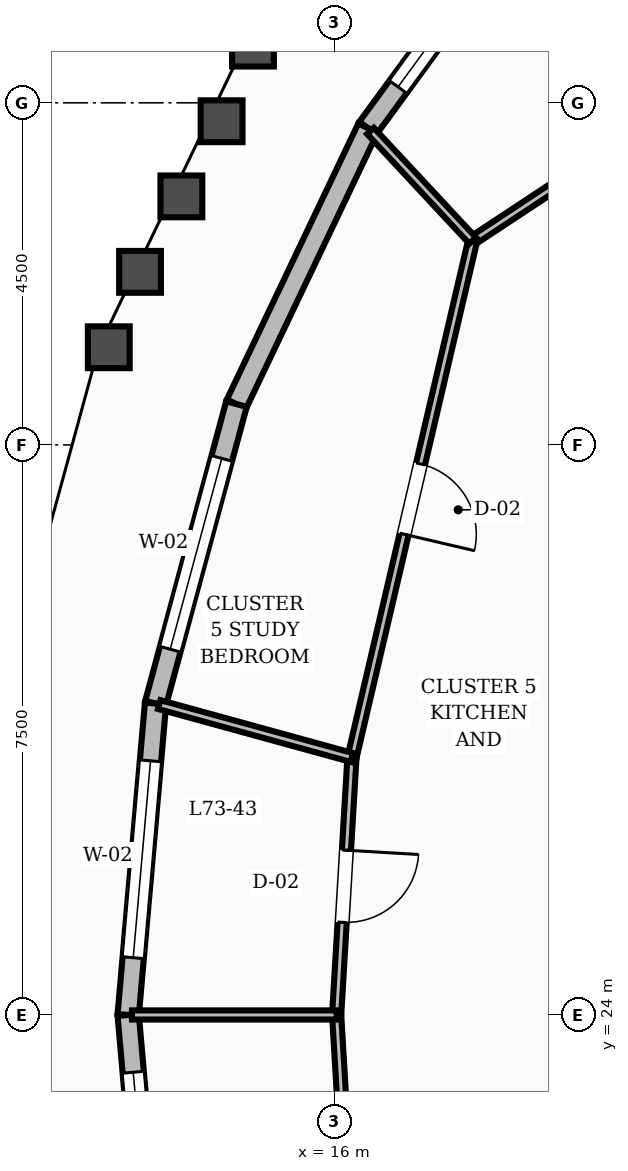
"""IFC4 building model, lengths in metres.
Left out: names, types, materials, properties, quantities, classifications, styles, units other than length and angle.
Written with IfcOpenShell. Run it as: python <this file> out.ifc"""

import sys

from ifc_helpers import new_model, si_unit, direction, frame, frame_2d, origin, place, context, subcontext, project, spatial, rectangle, extrude, element, fill, save


model = new_model("IFC4")
c1 = context("Model", 3, precision=1e-05, world=origin(), true_north=direction((0.0, 1.0)))
c2 = subcontext(c1, "Body", "Model", "MODEL_VIEW")
j1 = project(units=[si_unit("LENGTHUNIT", "METRE"), si_unit("PLANEANGLEUNIT", "RADIAN")], contexts=[c1])
p1 = place(None, origin())
s1 = spatial("IfcSite", under=j1, at=p1, CompositionType="ELEMENT")
p2 = place(p1, origin())
s2 = spatial("IfcBuilding", under=s1, at=p2, CompositionType="ELEMENT")
p3 = place(p2, frame((0.0, 0.0, 279.6)))
s3 = spatial("IfcBuildingStorey", under=s2, at=p3, CompositionType="ELEMENT", Elevation=279.6)
p4 = place(p3, frame((18.768, 38.85, 0.0), z_axis=(0.0, 0.0, 1.0), x_axis=(-0.590275846693, -0.807201601095, 0.0)))
e1 = element("IfcWall", 1, at=p4, inside=s3, PredefinedType="STANDARD", context=c2, shape_type="SweptSolid", body=[
    extrude(rectangle(XDim=3.942, YDim=0.28, at=frame_2d((1.971, 0.0))), origin(), (0.0, 0.0, 1.0), 2.88),
])
p5 = place(p4, frame((0.671, 0.0, 0.8)))
e2 = element("IfcOpeningElement", 2, at=p5, cuts=e1, PredefinedType="OPENING", context=c2, shape_type="SweptSolid", body=[
    extrude(rectangle(XDim=2.6, YDim=1.65, at=frame_2d((1.3, 0.825))), frame((0.0, 0.15, 0.0), z_axis=(0.0, -1.0, 0.0), x_axis=(1.0, 0.0, 0.0)), (0.0, 0.0, 1.0), 0.3),
])
p6 = place(p3, frame((16.441, 35.667, 0.0), z_axis=(0.0, 0.0, 1.0), x_axis=(-0.430011346388, -0.902823483289, 0.0)))
e3 = element("IfcWall", 3, at=p6, inside=s3, PredefinedType="STANDARD", context=c2, shape_type="SweptSolid", body=[
    extrude(rectangle(XDim=4.021, YDim=0.28, at=frame_2d((2.011, 0.0))), origin(), (0.0, 0.0, 1.0), 2.88),
])
p7 = place(p3, frame((14.712, 32.037, 0.0), z_axis=(0.0, 0.0, 1.0), x_axis=(-0.260889436927, -0.965368686927, 0.0)))
e4 = element("IfcWall", 4, at=p7, inside=s3, PredefinedType="STANDARD", context=c2, shape_type="SweptSolid", body=[
    extrude(rectangle(XDim=4.081, YDim=0.28, at=frame_2d((2.041, 0.0))), origin(), (0.0, 0.0, 1.0), 2.88),
])
p8 = place(p7, frame((0.74, 0.0, 0.8)))
e5 = element("IfcOpeningElement", 5, at=p8, cuts=e4, PredefinedType="OPENING", context=c2, shape_type="SweptSolid", body=[
    extrude(rectangle(XDim=2.6, YDim=1.65, at=frame_2d((1.3, 0.825))), frame((0.0, 0.15, 0.0), z_axis=(0.0, -1.0, 0.0), x_axis=(1.0, 0.0, 0.0)), (0.0, 0.0, 1.0), 0.3),
])
p9 = place(p3, frame((13.647, 28.097, 0.0), z_axis=(0.0, 0.0, 1.0), x_axis=(-0.087441623723, -0.996169645412, 0.0)))
e6 = element("IfcWall", 6, at=p9, inside=s3, PredefinedType="STANDARD", context=c2, shape_type="SweptSolid", body=[
    extrude(rectangle(XDim=4.113, YDim=0.28, at=frame_2d((2.056, 0.0))), origin(), (0.0, 0.0, 1.0), 2.88),
])
p10 = place(p9, frame((0.756, 0.0, 0.8)))
e7 = element("IfcOpeningElement", 7, at=p10, cuts=e6, PredefinedType="OPENING", context=c2, shape_type="SweptSolid", body=[
    extrude(rectangle(XDim=2.6, YDim=1.65, at=frame_2d((1.3, 0.825))), frame((0.0, 0.15, 0.0), z_axis=(0.0, -1.0, 0.0), x_axis=(1.0, 0.0, 0.0)), (0.0, 0.0, 1.0), 0.3),
])
p11 = place(p3, frame((13.287, 24.0, 0.0), z_axis=(0.0, 0.0, 1.0), x_axis=(0.087441623723, -0.996169645412, 0.0)))
e8 = element("IfcWall", 8, at=p11, inside=s3, PredefinedType="STANDARD", context=c2, shape_type="SweptSolid", body=[
    extrude(rectangle(XDim=4.113, YDim=0.28, at=frame_2d((2.056, 0.0))), origin(), (0.0, 0.0, 1.0), 2.88),
])
p12 = place(p11, frame((0.756, 0.0, 0.8)))
e9 = element("IfcOpeningElement", 9, at=p12, cuts=e8, PredefinedType="OPENING", context=c2, shape_type="SweptSolid", body=[
    extrude(rectangle(XDim=2.6, YDim=1.65, at=frame_2d((1.3, 0.825))), frame((0.0, 0.15, 0.0), z_axis=(0.0, -1.0, 0.0), x_axis=(1.0, 0.0, 0.0)), (0.0, 0.0, 1.0), 0.3),
])
p13 = place(p3, frame((23.429, 37.892, 0.0), z_axis=(0.0, 0.0, 1.0), x_axis=(-0.834428061238, -0.551116875643, 0.0)))
e10 = element("IfcWall", 10, at=p13, inside=s3, PredefinedType="PARTITIONING", context=c2, shape_type="SweptSolid", body=[
    extrude(rectangle(XDim=6.723, YDim=0.12, at=frame_2d((3.362, 0.0))), origin(), (0.0, 0.0, 1.0), 2.87),
])
p14 = place(p13, frame((3.963, 0.0, 0.0)))
e11 = element("IfcOpeningElement", 11, at=p14, cuts=e10, PredefinedType="OPENING", context=c2, shape_type="SweptSolid", body=[
    extrude(rectangle(XDim=0.95, YDim=2.1, at=frame_2d((0.475, 1.05))), frame((0.0, 0.07, 0.0), z_axis=(0.0, -1.0, 0.0), x_axis=(1.0, 0.0, 0.0)), (0.0, 0.0, 1.0), 0.14),
])
p15 = place(p3, frame((17.819, 34.187, 0.0), z_axis=(0.0, 0.0, 1.0), x_axis=(-0.22738655048, -0.973804578271, 0.0)))
e12 = element("IfcWall", 12, at=p15, inside=s3, PredefinedType="PARTITIONING", context=c2, shape_type="SweptSolid", body=[
    extrude(rectangle(XDim=6.983, YDim=0.12, at=frame_2d((3.492, 0.0))), origin(), (0.0, 0.0, 1.0), 2.87),
])
p16 = place(p15, frame((3.017, 0.0, 0.0)))
e13 = element("IfcOpeningElement", 13, at=p16, cuts=e12, PredefinedType="OPENING", context=c2, shape_type="SweptSolid", body=[
    extrude(rectangle(XDim=0.95, YDim=2.1, at=frame_2d((0.475, 1.05))), frame((0.0, 0.07, 0.0), z_axis=(0.0, -1.0, 0.0), x_axis=(1.0, 0.0, 0.0)), (0.0, 0.0, 1.0), 0.14),
])
p17 = place(p3, frame((17.819, 34.187, 0.0), z_axis=(0.0, 0.0, 1.0), x_axis=(-0.681404809589, 0.73190674643, 0.0)))
e14 = element("IfcWall", 14, at=p17, inside=s3, PredefinedType="PARTITIONING", context=c2, shape_type="SweptSolid", body=[
    extrude(rectangle(XDim=1.972, YDim=0.12, at=frame_2d((0.986, 0.0))), origin(), (0.0, 0.0, 1.0), 2.87),
])
p18 = place(p3, frame((16.231, 27.387, 0.0), z_axis=(0.0, 0.0, 1.0), x_axis=(-0.059367421014, -0.998236199164, 0.0)))
e15 = element("IfcWall", 15, at=p18, inside=s3, PredefinedType="PARTITIONING", context=c2, shape_type="SweptSolid", body=[
    extrude(rectangle(XDim=3.393, YDim=0.12, at=frame_2d((1.696, 0.0))), origin(), (0.0, 0.0, 1.0), 2.87),
])
p19 = place(p18, frame((1.221, 0.0, 0.0)))
e16 = element("IfcOpeningElement", 16, at=p19, cuts=e15, PredefinedType="OPENING", context=c2, shape_type="SweptSolid", body=[
    extrude(rectangle(XDim=0.95, YDim=2.1, at=frame_2d((0.475, 1.05))), frame((0.0, 0.07, 0.0), z_axis=(0.0, -1.0, 0.0), x_axis=(1.0, 0.0, 0.0)), (0.0, 0.0, 1.0), 0.14),
])
p20 = place(p3, frame((16.231, 27.387, 0.0), z_axis=(0.0, 0.0, 1.0), x_axis=(-0.964245725416, 0.265009775324, 0.0)))
e17 = element("IfcWall", 17, at=p20, inside=s3, PredefinedType="PARTITIONING", context=c2, shape_type="SweptSolid", body=[
    extrude(rectangle(XDim=2.63, YDim=0.12, at=frame_2d((1.315, 0.0))), origin(), (0.0, 0.0, 1.0), 2.87),
])
p21 = place(p3, frame((16.03, 24.0, 0.0), z_axis=(0.0, 0.0, 1.0), x_axis=(0.059367421014, -0.998236199164, 0.0)))
e18 = element("IfcWall", 18, at=p21, inside=s3, PredefinedType="PARTITIONING", context=c2, shape_type="SweptSolid", body=[
    extrude(rectangle(XDim=3.393, YDim=0.12, at=frame_2d((1.696, 0.0))), origin(), (0.0, 0.0, 1.0), 2.87),
])
p22 = place(p21, frame((1.221, 0.0, 0.0)))
e19 = element("IfcOpeningElement", 19, at=p22, cuts=e18, PredefinedType="OPENING", context=c2, shape_type="SweptSolid", body=[
    extrude(rectangle(XDim=0.95, YDim=2.1, at=frame_2d((0.475, 1.05))), frame((0.0, 0.07, 0.0), z_axis=(0.0, -1.0, 0.0), x_axis=(1.0, 0.0, 0.0)), (0.0, 0.0, 1.0), 0.14),
])
p23 = place(p3, frame((16.03, 24.0, 0.0), z_axis=(0.0, 0.0, 1.0), x_axis=(-1.0, 0.0, 0.0)))
e20 = element("IfcWall", 20, at=p23, inside=s3, PredefinedType="PARTITIONING", context=c2, shape_type="SweptSolid", body=[
    extrude(rectangle(XDim=2.692, YDim=0.12, at=frame_2d((1.346, 0.0))), origin(), (0.0, 0.0, 1.0), 2.87),
])
p24 = place(p5, origin())
e21 = element("IfcWindow", 21, at=p24, inside=s3, PartitioningType="SINGLE_PANEL", PredefinedType="WINDOW", context=c2, shape_type="SweptSolid", body=[
    extrude(rectangle(XDim=2.6, YDim=1.65, at=frame_2d((1.3, 0.825))), frame((0.0, 0.03, 0.0), z_axis=(0.0, -1.0, 0.0), x_axis=(1.0, 0.0, 0.0)), (0.0, 0.0, 1.0), 0.06),
])
fill(e2, e21)
p25 = place(p8, origin())
e22 = element("IfcWindow", 22, at=p25, inside=s3, PartitioningType="SINGLE_PANEL", PredefinedType="WINDOW", context=c2, shape_type="SweptSolid", body=[
    extrude(rectangle(XDim=2.6, YDim=1.65, at=frame_2d((1.3, 0.825))), frame((0.0, 0.03, 0.0), z_axis=(0.0, -1.0, 0.0), x_axis=(1.0, 0.0, 0.0)), (0.0, 0.0, 1.0), 0.06),
])
fill(e5, e22)
p26 = place(p10, origin())
e23 = element("IfcWindow", 23, at=p26, inside=s3, PartitioningType="SINGLE_PANEL", PredefinedType="WINDOW", context=c2, shape_type="SweptSolid", body=[
    extrude(rectangle(XDim=2.6, YDim=1.65, at=frame_2d((1.3, 0.825))), frame((0.0, 0.03, 0.0), z_axis=(0.0, -1.0, 0.0), x_axis=(1.0, 0.0, 0.0)), (0.0, 0.0, 1.0), 0.06),
])
fill(e7, e23)
p27 = place(p12, origin())
e24 = element("IfcWindow", 24, at=p27, inside=s3, PartitioningType="SINGLE_PANEL", PredefinedType="WINDOW", context=c2, shape_type="SweptSolid", body=[
    extrude(rectangle(XDim=2.6, YDim=1.65, at=frame_2d((1.3, 0.825))), frame((0.0, 0.03, 0.0), z_axis=(0.0, -1.0, 0.0), x_axis=(1.0, 0.0, 0.0)), (0.0, 0.0, 1.0), 0.06),
])
fill(e9, e24)
p28 = place(p16, origin())
e25 = element("IfcDoor", 25, at=p28, inside=s3, OperationType="SINGLE_SWING_RIGHT", PredefinedType="DOOR", context=c2, shape_type="SweptSolid", body=[
    extrude(rectangle(XDim=0.95, YDim=2.1, at=frame_2d((0.475, 1.05))), frame((0.0, 0.025, 0.0), z_axis=(0.0, -1.0, 0.0), x_axis=(1.0, 0.0, 0.0)), (0.0, 0.0, 1.0), 0.05),
])
fill(e13, e25)
p29 = place(p19, origin())
e26 = element("IfcDoor", 26, at=p29, inside=s3, OperationType="SINGLE_SWING_LEFT", PredefinedType="DOOR", context=c2, shape_type="SweptSolid", body=[
    extrude(rectangle(XDim=0.95, YDim=2.1, at=frame_2d((0.475, 1.05))), frame((0.0, 0.025, 0.0), z_axis=(0.0, -1.0, 0.0), x_axis=(1.0, 0.0, 0.0)), (0.0, 0.0, 1.0), 0.05),
])
fill(e16, e26)
save(model, sys.argv[1])
